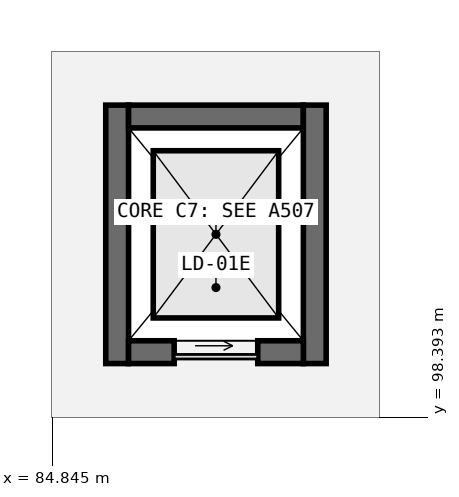
"""IFC4 building model, lengths in metres.
Left out: names, types, materials, properties, quantities, classifications, styles, units other than length and angle.
Written with IfcOpenShell. Run it as: python <this file> out.ifc"""

import sys

from ifc_helpers import new_model, si_unit, direction, frame, frame_2d, origin, place, context, subcontext, project, spatial, rectangle, extrude, element, fill, save


model = new_model("IFC4")
c1 = context("Model", 3, precision=1e-05, world=origin(), true_north=direction((0.0, 1.0)))
c2 = subcontext(c1, "Body", "Model", "MODEL_VIEW")
j1 = project(units=[si_unit("LENGTHUNIT", "METRE"), si_unit("PLANEANGLEUNIT", "RADIAN")], contexts=[c1])
p1 = place(None, origin())
s1 = spatial("IfcSite", under=j1, at=p1, CompositionType="ELEMENT")
p2 = place(p1, origin())
s2 = spatial("IfcBuilding", under=s1, at=p2, CompositionType="ELEMENT")
p3 = place(p2, frame((0.0, 0.0, 23.45)))
s3 = spatial("IfcBuildingStorey", under=s2, at=p3, CompositionType="ELEMENT", Elevation=23.45)
p4 = place(p3, frame((85.7, 99.1, 0.0), z_axis=(0.0, 0.0, 1.0), x_axis=(0.0, 1.0, 0.0)))
e1 = element("IfcWall", 1, at=p4, inside=s3, PredefinedType="SHEAR", context=c2, shape_type="SweptSolid", body=[
    extrude(rectangle(XDim=3.4, YDim=0.3, at=frame_2d((1.7, 0.0))), origin(), (0.0, 0.0, 1.0), 3.2),
])
p5 = place(p3, frame((85.85, 102.35, 0.0), z_axis=(0.0, 0.0, 1.0), x_axis=(1.0, 0.0, 0.0)))
e2 = element("IfcWall", 2, at=p5, inside=s3, PredefinedType="SHEAR", context=c2, shape_type="SweptSolid", body=[
    extrude(rectangle(XDim=2.3, YDim=0.3, at=frame_2d((1.15, 0.0))), origin(), (0.0, 0.0, 1.0), 3.2),
])
p6 = place(p3, frame((88.3, 102.5, 0.0), z_axis=(0.0, 0.0, 1.0), x_axis=(0.0, -1.0, 0.0)))
e3 = element("IfcWall", 3, at=p6, inside=s3, PredefinedType="SHEAR", context=c2, shape_type="SweptSolid", body=[
    extrude(rectangle(XDim=3.4, YDim=0.3, at=frame_2d((1.7, 0.0))), origin(), (0.0, 0.0, 1.0), 3.2),
])
p7 = place(p3, frame((88.15, 99.25, 0.0), z_axis=(0.0, 0.0, 1.0), x_axis=(-1.0, 0.0, 0.0)))
e4 = element("IfcWall", 4, at=p7, inside=s3, PredefinedType="SHEAR", context=c2, shape_type="SweptSolid", body=[
    extrude(rectangle(XDim=2.3, YDim=0.3, at=frame_2d((1.15, 0.0))), origin(), (0.0, 0.0, 1.0), 3.2),
])
p8 = place(p7, frame((0.6, 0.0, 0.0)))
e5 = element("IfcOpeningElement", 5, at=p8, cuts=e4, PredefinedType="OPENING", context=c2, shape_type="SweptSolid", body=[
    extrude(rectangle(XDim=1.1, YDim=2.15, at=frame_2d((0.55, 1.075))), frame((0.0, 0.16, 0.0), z_axis=(0.0, -1.0, 0.0), x_axis=(1.0, 0.0, 0.0)), (0.0, 0.0, 1.0), 0.32),
])
p9 = place(p8, origin())
e6 = element("IfcDoor", 6, at=p9, inside=s3, OperationType="SLIDING_TO_LEFT", PredefinedType="USERDEFINED", context=c2, shape_type="SweptSolid", body=[
    extrude(rectangle(XDim=1.1, YDim=2.15, at=frame_2d((0.55, 1.075))), frame((0.0, 0.025, 0.0), z_axis=(0.0, -1.0, 0.0), x_axis=(1.0, 0.0, 0.0)), (0.0, 0.0, 1.0), 0.05),
])
fill(e5, e6)
save(model, sys.argv[1])
